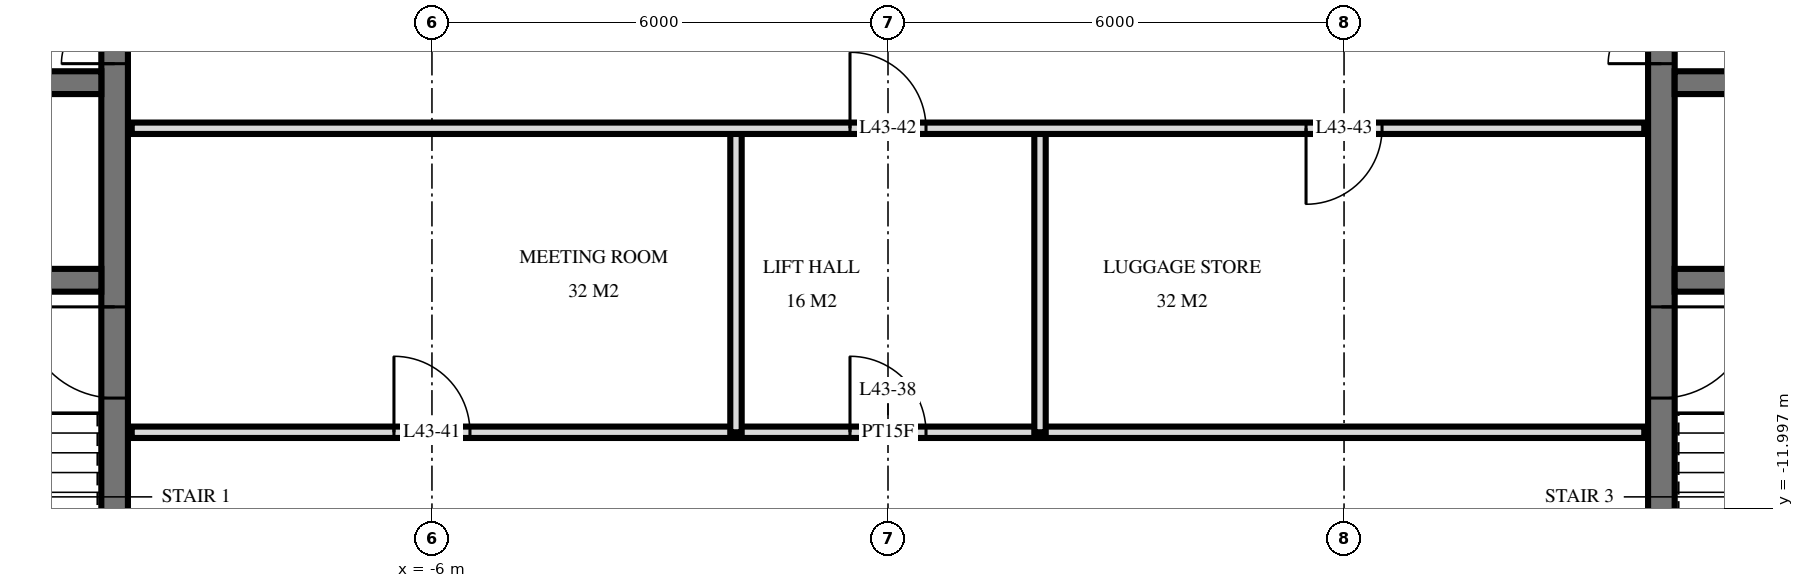
"""IFC4 building model, lengths in metres.
Left out: names, types, materials, properties, quantities, classifications, styles, units other than length and angle.
Written with IfcOpenShell. Run it as: python <this file> out.ifc"""

import sys

from ifc_helpers import new_model, si_unit, direction, frame, frame_2d, origin, place, context, subcontext, project, spatial, rectangle, extrude, element, fill, save


model = new_model("IFC4")
c1 = context("Model", 3, precision=1e-05, world=origin(), true_north=direction((0.0, 1.0)))
c2 = subcontext(c1, "Body", "Model", "MODEL_VIEW")
j1 = project(units=[si_unit("LENGTHUNIT", "METRE"), si_unit("PLANEANGLEUNIT", "RADIAN")], contexts=[c1])
p1 = place(None, origin())
s1 = spatial("IfcSite", under=j1, at=p1, CompositionType="ELEMENT")
p2 = place(p1, origin())
s2 = spatial("IfcBuilding", under=s1, at=p2, CompositionType="ELEMENT")
p3 = place(p2, frame((0.0, 0.0, 166.8)))
s3 = spatial("IfcBuildingStorey", under=s2, at=p3, CompositionType="ELEMENT", Elevation=166.8)
p4 = place(p3, frame((-10.175, -14.55, 0.0), z_axis=(0.0, 0.0, 1.0), x_axis=(0.0, 1.0, 0.0)))
e1 = element("IfcWall", 1, at=p4, inside=s3, PredefinedType="SHEAR", context=c2, shape_type="SweptSolid", body=[
    extrude(rectangle(XDim=14.1, YDim=0.35, at=frame_2d((7.05, 0.0))), origin(), (0.0, 0.0, 1.0), 3.6),
])
p5 = place(p4, frame((8.4, 0.0, 0.0)))
e2 = element("IfcOpeningElement", 2, at=p5, cuts=e1, PredefinedType="OPENING", context=c2, shape_type="SweptSolid", body=[
    extrude(rectangle(XDim=1.4, YDim=2.4, at=frame_2d((0.7, 1.2))), frame((0.0, 0.185, 0.0), z_axis=(0.0, -1.0, 0.0), x_axis=(1.0, 0.0, 0.0)), (0.0, 0.0, 1.0), 0.37),
])
p6 = place(p4, frame((10.0, 0.0, 0.0)))
e3 = element("IfcOpeningElement", 3, at=p6, cuts=e1, PredefinedType="OPENING", context=c2, shape_type="SweptSolid", body=[
    extrude(rectangle(XDim=1.4, YDim=2.4, at=frame_2d((0.7, 1.2))), frame((0.0, 0.185, 0.0), z_axis=(0.0, -1.0, 0.0), x_axis=(1.0, 0.0, 0.0)), (0.0, 0.0, 1.0), 0.37),
])
p7 = place(p4, frame((4.0, 0.0, 0.0)))
e4 = element("IfcOpeningElement", 4, at=p7, cuts=e1, PredefinedType="OPENING", context=c2, shape_type="SweptSolid", body=[
    extrude(rectangle(XDim=1.2, YDim=2.1, at=frame_2d((0.6, 1.05))), frame((0.0, 0.185, 0.0), z_axis=(0.0, -1.0, 0.0), x_axis=(1.0, 0.0, 0.0)), (0.0, 0.0, 1.0), 0.37),
])
p8 = place(p3, frame((-24.05, -6.4, 0.0), z_axis=(0.0, 0.0, 1.0), x_axis=(1.0, 0.0, 0.0)))
e5 = element("IfcWall", 5, at=p8, inside=s3, PredefinedType="SHEAR", context=c2, shape_type="SweptSolid", body=[
    extrude(rectangle(XDim=13.7, YDim=0.3, at=frame_2d((6.85, 0.0))), origin(), (0.0, 0.0, 1.0), 3.6),
])
p9 = place(p8, frame((0.55, 0.0, 0.0)))
e6 = element("IfcOpeningElement", 6, at=p9, cuts=e5, PredefinedType="OPENING", context=c2, shape_type="SweptSolid", body=[
    extrude(rectangle(XDim=1.1, YDim=2.1, at=frame_2d((0.55, 1.05))), frame((0.0, 0.16, 0.0), z_axis=(0.0, -1.0, 0.0), x_axis=(1.0, 0.0, 0.0)), (0.0, 0.0, 1.0), 0.32),
])
p10 = place(p8, frame((5.8, 0.0, 0.0)))
e7 = element("IfcOpeningElement", 7, at=p10, cuts=e5, PredefinedType="OPENING", context=c2, shape_type="SweptSolid", body=[
    extrude(rectangle(XDim=1.1, YDim=2.1, at=frame_2d((0.55, 1.05))), frame((0.0, 0.16, 0.0), z_axis=(0.0, -1.0, 0.0), x_axis=(1.0, 0.0, 0.0)), (0.0, 0.0, 1.0), 0.32),
])
p11 = place(p3, frame((-24.05, -9.0, 0.0), z_axis=(0.0, 0.0, 1.0), x_axis=(1.0, 0.0, 0.0)))
e8 = element("IfcWall", 8, at=p11, inside=s3, PredefinedType="SHEAR", context=c2, shape_type="SweptSolid", body=[
    extrude(rectangle(XDim=13.7, YDim=0.3, at=frame_2d((6.85, 0.0))), origin(), (0.0, 0.0, 1.0), 3.6),
])
p12 = place(p11, frame((8.8, 0.0, 0.0)))
e9 = element("IfcOpeningElement", 9, at=p12, cuts=e8, PredefinedType="OPENING", context=c2, shape_type="SweptSolid", body=[
    extrude(rectangle(XDim=1.1, YDim=2.1, at=frame_2d((0.55, 1.05))), frame((0.0, 0.16, 0.0), z_axis=(0.0, -1.0, 0.0), x_axis=(1.0, 0.0, 0.0)), (0.0, 0.0, 1.0), 0.32),
])
p13 = place(p3, frame((10.175, -14.55, 0.0), z_axis=(0.0, 0.0, 1.0), x_axis=(0.0, 1.0, 0.0)))
e10 = element("IfcWall", 10, at=p13, inside=s3, PredefinedType="SHEAR", context=c2, shape_type="SweptSolid", body=[
    extrude(rectangle(XDim=14.1, YDim=0.35, at=frame_2d((7.05, 0.0))), origin(), (0.0, 0.0, 1.0), 3.6),
])
p14 = place(p13, frame((8.4, 0.0, 0.0)))
e11 = element("IfcOpeningElement", 11, at=p14, cuts=e10, PredefinedType="OPENING", context=c2, shape_type="SweptSolid", body=[
    extrude(rectangle(XDim=1.4, YDim=2.4, at=frame_2d((0.7, 1.2))), frame((0.0, 0.185, 0.0), z_axis=(0.0, -1.0, 0.0), x_axis=(1.0, 0.0, 0.0)), (0.0, 0.0, 1.0), 0.37),
])
p15 = place(p13, frame((10.0, 0.0, 0.0)))
e12 = element("IfcOpeningElement", 12, at=p15, cuts=e10, PredefinedType="OPENING", context=c2, shape_type="SweptSolid", body=[
    extrude(rectangle(XDim=1.4, YDim=2.4, at=frame_2d((0.7, 1.2))), frame((0.0, 0.185, 0.0), z_axis=(0.0, -1.0, 0.0), x_axis=(1.0, 0.0, 0.0)), (0.0, 0.0, 1.0), 0.37),
])
p16 = place(p13, frame((4.0, 0.0, 0.0)))
e13 = element("IfcOpeningElement", 13, at=p16, cuts=e10, PredefinedType="OPENING", context=c2, shape_type="SweptSolid", body=[
    extrude(rectangle(XDim=1.2, YDim=2.1, at=frame_2d((0.6, 1.05))), frame((0.0, 0.185, 0.0), z_axis=(0.0, -1.0, 0.0), x_axis=(1.0, 0.0, 0.0)), (0.0, 0.0, 1.0), 0.37),
])
p17 = place(p3, frame((10.35, -6.4, 0.0), z_axis=(0.0, 0.0, 1.0), x_axis=(1.0, 0.0, 0.0)))
e14 = element("IfcWall", 14, at=p17, inside=s3, PredefinedType="SHEAR", context=c2, shape_type="SweptSolid", body=[
    extrude(rectangle(XDim=13.7, YDim=0.3, at=frame_2d((6.85, 0.0))), origin(), (0.0, 0.0, 1.0), 3.6),
])
p18 = place(p17, frame((12.05, 0.0, 0.0)))
e15 = element("IfcOpeningElement", 15, at=p18, cuts=e14, PredefinedType="OPENING", context=c2, shape_type="SweptSolid", body=[
    extrude(rectangle(XDim=1.1, YDim=2.1, at=frame_2d((0.55, 1.05))), frame((0.0, 0.16, 0.0), z_axis=(0.0, -1.0, 0.0), x_axis=(1.0, 0.0, 0.0)), (0.0, 0.0, 1.0), 0.32),
])
p19 = place(p17, frame((6.8, 0.0, 0.0)))
e16 = element("IfcOpeningElement", 16, at=p19, cuts=e14, PredefinedType="OPENING", context=c2, shape_type="SweptSolid", body=[
    extrude(rectangle(XDim=1.1, YDim=2.1, at=frame_2d((0.55, 1.05))), frame((0.0, 0.16, 0.0), z_axis=(0.0, -1.0, 0.0), x_axis=(1.0, 0.0, 0.0)), (0.0, 0.0, 1.0), 0.32),
])
p20 = place(p3, frame((10.35, -9.0, 0.0), z_axis=(0.0, 0.0, 1.0), x_axis=(1.0, 0.0, 0.0)))
e17 = element("IfcWall", 17, at=p20, inside=s3, PredefinedType="SHEAR", context=c2, shape_type="SweptSolid", body=[
    extrude(rectangle(XDim=13.7, YDim=0.3, at=frame_2d((6.85, 0.0))), origin(), (0.0, 0.0, 1.0), 3.6),
])
p21 = place(p20, frame((3.8, 0.0, 0.0)))
e18 = element("IfcOpeningElement", 18, at=p21, cuts=e17, PredefinedType="OPENING", context=c2, shape_type="SweptSolid", body=[
    extrude(rectangle(XDim=1.1, YDim=2.1, at=frame_2d((0.55, 1.05))), frame((0.0, 0.16, 0.0), z_axis=(0.0, -1.0, 0.0), x_axis=(1.0, 0.0, 0.0)), (0.0, 0.0, 1.0), 0.32),
])
for number, where, z_axis, x_axis in (
    (19, (2.0, -11.0, 0.0), (0.0, 0.0, 1.0), (0.0, 1.0, 0.0)),
    (20, (-2.0, -11.0, 0.0), (0.0, 0.0, 1.0), (0.0, 1.0, 0.0)),
):
    element("IfcWall", number, at=place(p3, frame(where, z_axis=z_axis, x_axis=x_axis)), inside=s3, PredefinedType="PARTITIONING", context=c2, shape_type="SweptSolid", body=[
        extrude(rectangle(XDim=4.0, YDim=0.15, at=frame_2d((2.0, 0.0))), origin(), (0.0, 0.0, 1.0), 3.32),
    ])
p22 = place(p3, frame((-9.95, -11.0, 0.0), z_axis=(0.0, 0.0, 1.0), x_axis=(1.0, 0.0, 0.0)))
e21 = element("IfcWall", 21, at=p22, inside=s3, PredefinedType="PARTITIONING", context=c2, shape_type="SweptSolid", body=[
    extrude(rectangle(XDim=19.9, YDim=0.15, at=frame_2d((9.95, 0.0))), origin(), (0.0, 0.0, 1.0), 3.32),
])
p23 = place(p22, frame((9.45, 0.0, 0.0)))
e22 = element("IfcOpeningElement", 22, at=p23, cuts=e21, PredefinedType="OPENING", context=c2, shape_type="SweptSolid", body=[
    extrude(rectangle(XDim=1.0, YDim=2.1, at=frame_2d((0.5, 1.05))), frame((0.0, 0.085, 0.0), z_axis=(0.0, -1.0, 0.0), x_axis=(1.0, 0.0, 0.0)), (0.0, 0.0, 1.0), 0.17),
])
p24 = place(p22, frame((3.45, 0.0, 0.0)))
e23 = element("IfcOpeningElement", 23, at=p24, cuts=e21, PredefinedType="OPENING", context=c2, shape_type="SweptSolid", body=[
    extrude(rectangle(XDim=1.0, YDim=2.1, at=frame_2d((0.5, 1.05))), frame((0.0, 0.085, 0.0), z_axis=(0.0, -1.0, 0.0), x_axis=(1.0, 0.0, 0.0)), (0.0, 0.0, 1.0), 0.17),
])
p25 = place(p3, frame((-9.95, -7.0, 0.0), z_axis=(0.0, 0.0, 1.0), x_axis=(1.0, 0.0, 0.0)))
e24 = element("IfcWall", 24, at=p25, inside=s3, PredefinedType="PARTITIONING", context=c2, shape_type="SweptSolid", body=[
    extrude(rectangle(XDim=19.9, YDim=0.15, at=frame_2d((9.95, 0.0))), origin(), (0.0, 0.0, 1.0), 3.32),
])
p26 = place(p25, frame((9.45, 0.0, 0.0)))
e25 = element("IfcOpeningElement", 25, at=p26, cuts=e24, PredefinedType="OPENING", context=c2, shape_type="SweptSolid", body=[
    extrude(rectangle(XDim=1.0, YDim=2.1, at=frame_2d((0.5, 1.05))), frame((0.0, 0.085, 0.0), z_axis=(0.0, -1.0, 0.0), x_axis=(1.0, 0.0, 0.0)), (0.0, 0.0, 1.0), 0.17),
])
p27 = place(p25, frame((15.45, 0.0, 0.0)))
e26 = element("IfcOpeningElement", 26, at=p27, cuts=e24, PredefinedType="OPENING", context=c2, shape_type="SweptSolid", body=[
    extrude(rectangle(XDim=1.0, YDim=2.1, at=frame_2d((0.5, 1.05))), frame((0.0, 0.085, 0.0), z_axis=(0.0, -1.0, 0.0), x_axis=(1.0, 0.0, 0.0)), (0.0, 0.0, 1.0), 0.17),
])
p28 = place(p5, origin())
e27 = element("IfcDoor", 27, at=p28, inside=s3, OperationType="DOUBLE_DOOR_SINGLE_SWING", PredefinedType="DOOR", context=c2, shape_type="SweptSolid", body=[
    extrude(rectangle(XDim=1.4, YDim=2.4, at=frame_2d((0.7, 1.2))), frame((0.0, 0.025, 0.0), z_axis=(0.0, -1.0, 0.0), x_axis=(1.0, 0.0, 0.0)), (0.0, 0.0, 1.0), 0.05),
])
fill(e2, e27)
p29 = place(p7, origin())
e28 = element("IfcDoor", 28, at=p29, inside=s3, OperationType="SINGLE_SWING_LEFT", PredefinedType="DOOR", context=c2, shape_type="SweptSolid", body=[
    extrude(rectangle(XDim=1.2, YDim=2.1, at=frame_2d((0.6, 1.05))), frame((0.0, 0.025, 0.0), z_axis=(0.0, -1.0, 0.0), x_axis=(1.0, 0.0, 0.0)), (0.0, 0.0, 1.0), 0.05),
])
fill(e4, e28)
p30 = place(p14, origin())
e29 = element("IfcDoor", 29, at=p30, inside=s3, OperationType="DOUBLE_DOOR_SINGLE_SWING", PredefinedType="DOOR", context=c2, shape_type="SweptSolid", body=[
    extrude(rectangle(XDim=1.4, YDim=2.4, at=frame_2d((0.7, 1.2))), frame((0.0, 0.025, 0.0), z_axis=(0.0, -1.0, 0.0), x_axis=(1.0, 0.0, 0.0)), (0.0, 0.0, 1.0), 0.05),
])
fill(e11, e29)
p31 = place(p16, frame((0.6, 0.0, 0.0), z_axis=(0.0, 0.0, 1.0), x_axis=(-1.0, 0.0, 0.0)))
e30 = element("IfcDoor", 30, at=p31, inside=s3, OperationType="SINGLE_SWING_RIGHT", PredefinedType="DOOR", context=c2, shape_type="SweptSolid", body=[
    extrude(rectangle(XDim=1.2, YDim=2.1, at=frame_2d((0.0, 1.05))), frame((0.0, -0.025, 0.0), z_axis=(0.0, 1.0, 0.0), x_axis=(-1.0, 0.0, 0.0)), (0.0, 0.0, 1.0), 0.05),
])
fill(e13, e30)
p32 = place(p23, origin())
e31 = element("IfcDoor", 31, at=p32, inside=s3, OperationType="SINGLE_SWING_RIGHT", PredefinedType="DOOR", context=c2, shape_type="SweptSolid", body=[
    extrude(rectangle(XDim=1.0, YDim=2.1, at=frame_2d((0.5, 1.05))), frame((0.0, 0.025, 0.0), z_axis=(0.0, -1.0, 0.0), x_axis=(1.0, 0.0, 0.0)), (0.0, 0.0, 1.0), 0.05),
])
fill(e22, e31)
p33 = place(p24, origin())
e32 = element("IfcDoor", 32, at=p33, inside=s3, OperationType="SINGLE_SWING_RIGHT", PredefinedType="DOOR", context=c2, shape_type="SweptSolid", body=[
    extrude(rectangle(XDim=1.0, YDim=2.1, at=frame_2d((0.5, 1.05))), frame((0.0, 0.025, 0.0), z_axis=(0.0, -1.0, 0.0), x_axis=(1.0, 0.0, 0.0)), (0.0, 0.0, 1.0), 0.05),
])
fill(e23, e32)
p34 = place(p26, origin())
e33 = element("IfcDoor", 33, at=p34, inside=s3, OperationType="SINGLE_SWING_RIGHT", PredefinedType="DOOR", context=c2, shape_type="SweptSolid", body=[
    extrude(rectangle(XDim=1.0, YDim=2.1, at=frame_2d((0.5, 1.05))), frame((0.0, 0.025, 0.0), z_axis=(0.0, -1.0, 0.0), x_axis=(1.0, 0.0, 0.0)), (0.0, 0.0, 1.0), 0.05),
])
fill(e25, e33)
p35 = place(p27, frame((0.5, 0.0, 0.0), z_axis=(0.0, 0.0, 1.0), x_axis=(-1.0, 0.0, 0.0)))
e34 = element("IfcDoor", 34, at=p35, inside=s3, OperationType="SINGLE_SWING_LEFT", PredefinedType="DOOR", context=c2, shape_type="SweptSolid", body=[
    extrude(rectangle(XDim=1.0, YDim=2.1, at=frame_2d((0.0, 1.05))), frame((0.0, -0.025, 0.0), z_axis=(0.0, 1.0, 0.0), x_axis=(-1.0, 0.0, 0.0)), (0.0, 0.0, 1.0), 0.05),
])
fill(e26, e34)
save(model, sys.argv[1])
